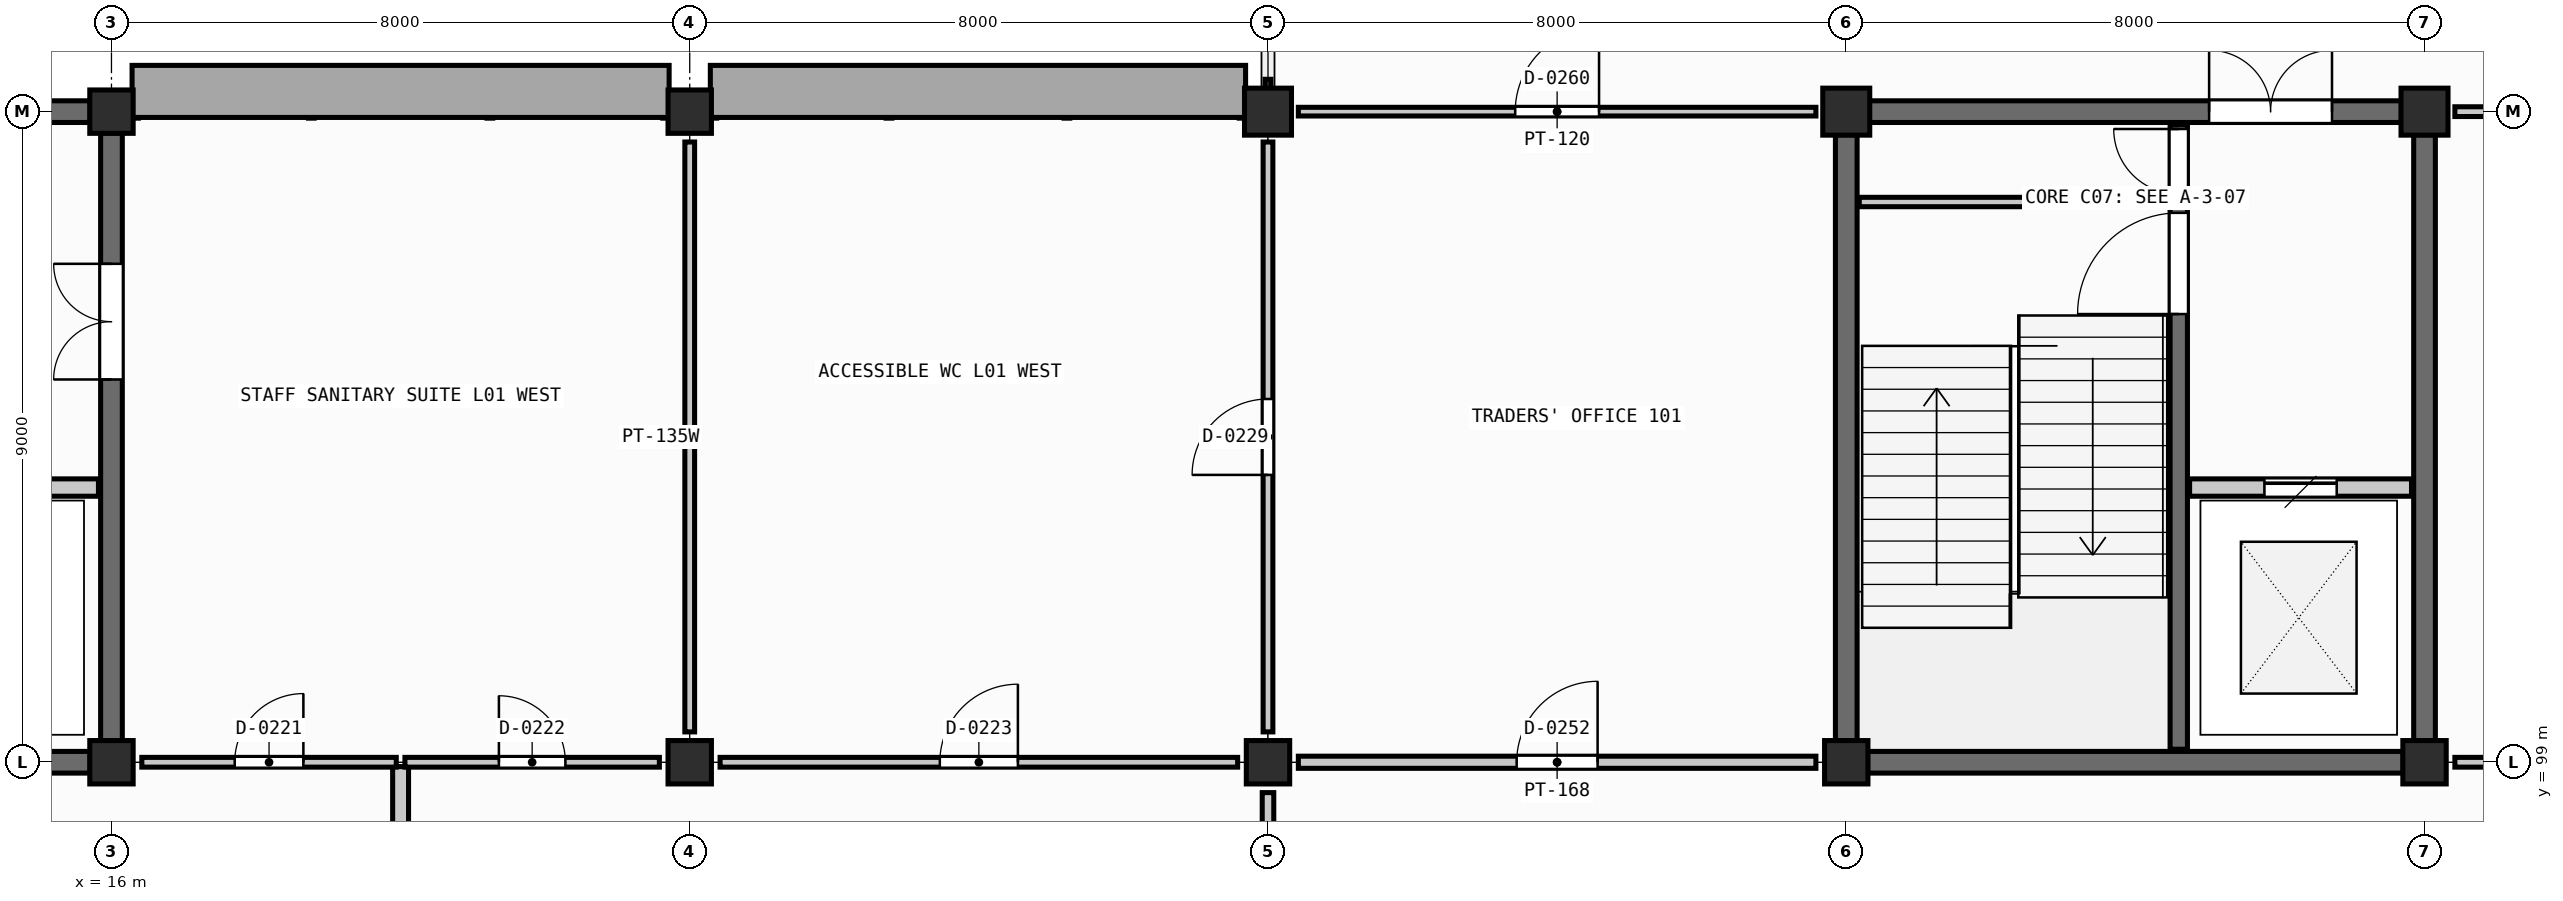
"""IFC4 building model, lengths in metres.
Left out: names, types, materials, properties, quantities, classifications, styles, units other than length and angle.
Written with IfcOpenShell. Run it as: python <this file> out.ifc"""

import sys

from ifc_helpers import new_model, si_unit, direction, frame, frame_2d, origin, origin_2d, place, context, subcontext, project, spatial, rectangle, extrude, element, fill, save


model = new_model("IFC4")
c1 = context("Model", 3, precision=1e-05, world=origin(), true_north=direction((0.0, 1.0)))
c2 = subcontext(c1, "Body", "Model", "MODEL_VIEW")
j1 = project(units=[si_unit("LENGTHUNIT", "METRE"), si_unit("PLANEANGLEUNIT", "RADIAN")], contexts=[c1])
p1 = place(None, origin())
s1 = spatial("IfcSite", under=j1, at=p1, CompositionType="ELEMENT")
p2 = place(p1, origin())
s2 = spatial("IfcBuilding", under=s1, at=p2, CompositionType="ELEMENT")
p3 = place(p2, frame((0.0, 0.0, 4.8)))
s3 = spatial("IfcBuildingStorey", under=s2, at=p3, CompositionType="ELEMENT", Elevation=4.8)
for number, where, z_axis, x_axis in (
    (1, (16.0, 99.0, 0.0), (0.0, 0.0, 1.0), (1.0, 0.0, 0.0)),
    (2, (16.0, 108.0, 0.0), (0.0, 0.0, 1.0), (1.0, 0.0, 0.0)),
    (3, (24.0, 99.0, 0.0), (0.0, 0.0, 1.0), (1.0, 0.0, 0.0)),
    (4, (24.0, 108.0, 0.0), (0.0, 0.0, 1.0), (1.0, 0.0, 0.0)),
    (5, (32.0, 99.0, 0.0), (0.0, 0.0, 1.0), (1.0, 0.0, 0.0)),
):
    element("IfcColumn", number, at=place(p3, frame(where, z_axis=z_axis, x_axis=x_axis)), inside=s3, PredefinedType="COLUMN", context=c2, shape_type="SweptSolid", body=[
        extrude(rectangle(XDim=0.6, YDim=0.6, at=origin_2d()), origin(), (0.0, 0.0, 1.0), 4.2),
    ])
p4 = place(p3, frame((32.0, 108.0, 0.0), z_axis=(0.0, 0.0, 1.0), x_axis=(1.0, 0.0, 0.0)))
e6 = element("IfcColumn", 6, at=p4, inside=s3, PredefinedType="COLUMN", context=c2, shape_type="SweptSolid", body=[
    extrude(rectangle(XDim=0.65, YDim=0.65, at=origin_2d()), origin(), (0.0, 0.0, 1.0), 4.2),
])
p5 = place(p3, frame((40.0, 99.0, 0.0), z_axis=(0.0, 0.0, 1.0), x_axis=(1.0, 0.0, 0.0)))
e7 = element("IfcColumn", 7, at=p5, inside=s3, PredefinedType="COLUMN", context=c2, shape_type="SweptSolid", body=[
    extrude(rectangle(XDim=0.6, YDim=0.6, at=origin_2d()), origin(), (0.0, 0.0, 1.0), 4.2),
])
p6 = place(p3, frame((40.0, 108.0, 0.0), z_axis=(0.0, 0.0, 1.0), x_axis=(1.0, 0.0, 0.0)))
e8 = element("IfcColumn", 8, at=p6, inside=s3, PredefinedType="COLUMN", context=c2, shape_type="SweptSolid", body=[
    extrude(rectangle(XDim=0.65, YDim=0.65, at=origin_2d()), origin(), (0.0, 0.0, 1.0), 4.2),
])
p7 = place(p3, frame((48.0, 99.0, 0.0), z_axis=(0.0, 0.0, 1.0), x_axis=(1.0, 0.0, 0.0)))
e9 = element("IfcColumn", 9, at=p7, inside=s3, PredefinedType="COLUMN", context=c2, shape_type="SweptSolid", body=[
    extrude(rectangle(XDim=0.6, YDim=0.6, at=origin_2d()), origin(), (0.0, 0.0, 1.0), 4.2),
])
p8 = place(p3, frame((48.0, 108.0, 0.0), z_axis=(0.0, 0.0, 1.0), x_axis=(1.0, 0.0, 0.0)))
e10 = element("IfcColumn", 10, at=p8, inside=s3, PredefinedType="COLUMN", context=c2, shape_type="SweptSolid", body=[
    extrude(rectangle(XDim=0.65, YDim=0.65, at=origin_2d()), origin(), (0.0, 0.0, 1.0), 4.2),
])
for number, where, z_axis, x_axis in (
    (11, (8.295, 99.0, 0.0), (0.0, 0.0, 1.0), (1.0, 0.0, 0.0)),
    (12, (8.295, 108.0, 0.0), (0.0, 0.0, 1.0), (1.0, 0.0, 0.0)),
):
    element("IfcWall", number, at=place(p3, frame(where, z_axis=z_axis, x_axis=x_axis)), inside=s3, PredefinedType="SHEAR", context=c2, shape_type="SweptSolid", body=[
        extrude(rectangle(XDim=7.41, YDim=0.3, at=frame_2d((3.705, 0.0))), origin(), (0.0, 0.0, 1.0), 3.935),
    ])
p9 = place(p3, frame((16.0, 99.295, 0.0), z_axis=(0.0, 0.0, 1.0), x_axis=(0.0, 1.0, 0.0)))
e13 = element("IfcWall", 13, at=p9, inside=s3, PredefinedType="SHEAR", context=c2, shape_type="SweptSolid", body=[
    extrude(rectangle(XDim=8.41, YDim=0.3, at=frame_2d((4.205, 0.0))), origin(), (0.0, 0.0, 1.0), 3.935),
])
p10 = place(p9, frame((5.0, 0.0, 0.0)))
e14 = element("IfcOpeningElement", 14, at=p10, cuts=e13, PredefinedType="OPENING", context=c2, shape_type="SweptSolid", body=[
    extrude(rectangle(XDim=1.6, YDim=2.2, at=frame_2d((0.8, 1.1))), frame((0.0, 0.16, 0.0), z_axis=(0.0, -1.0, 0.0), x_axis=(1.0, 0.0, 0.0)), (0.0, 0.0, 1.0), 0.32),
])
p11 = place(p3, frame((12.75, 102.8, 0.0), z_axis=(0.0, 0.0, 1.0), x_axis=(1.0, 0.0, 0.0)))
e15 = element("IfcWall", 15, at=p11, inside=s3, PredefinedType="SHEAR", context=c2, shape_type="SweptSolid", body=[
    extrude(rectangle(XDim=3.07, YDim=0.24, at=frame_2d((1.535, 0.0))), origin(), (0.0, 0.0, 1.0), 3.285),
])
p12 = place(p11, frame((1.035, 0.0, 0.0)))
e16 = element("IfcOpeningElement", 16, at=p12, cuts=e15, PredefinedType="OPENING", context=c2, shape_type="SweptSolid", body=[
    extrude(rectangle(XDim=1.0, YDim=2.15, at=frame_2d((0.5, 1.075))), frame((0.0, 0.13, 0.0), z_axis=(0.0, -1.0, 0.0), x_axis=(1.0, 0.0, 0.0)), (0.0, 0.0, 1.0), 0.26),
])
p13 = place(p3, frame((40.295, 99.0, 0.0), z_axis=(0.0, 0.0, 1.0), x_axis=(1.0, 0.0, 0.0)))
e17 = element("IfcWall", 17, at=p13, inside=s3, PredefinedType="SHEAR", context=c2, shape_type="SweptSolid", body=[
    extrude(rectangle(XDim=7.41, YDim=0.3, at=frame_2d((3.705, 0.0))), origin(), (0.0, 0.0, 1.0), 3.955),
])
p14 = place(p3, frame((40.32, 108.0, 0.0), z_axis=(0.0, 0.0, 1.0), x_axis=(1.0, 0.0, 0.0)))
e18 = element("IfcWall", 18, at=p14, inside=s3, PredefinedType="SHEAR", context=c2, shape_type="SweptSolid", body=[
    extrude(rectangle(XDim=7.36, YDim=0.3, at=frame_2d((3.68, 0.0))), origin(), (0.0, 0.0, 1.0), 3.955),
])
p15 = place(p14, frame((4.7, 0.0, 0.0)))
e19 = element("IfcOpeningElement", 19, at=p15, cuts=e18, PredefinedType="OPENING", context=c2, shape_type="SweptSolid", body=[
    extrude(rectangle(XDim=1.7, YDim=2.25, at=frame_2d((0.85, 1.125))), frame((0.0, 0.16, 0.0), z_axis=(0.0, -1.0, 0.0), x_axis=(1.0, 0.0, 0.0)), (0.0, 0.0, 1.0), 0.32),
])
for number, where, z_axis, x_axis in (
    (20, (40.0, 99.295, 0.0), (0.0, 0.0, 1.0), (0.0, 1.0, 0.0)),
    (21, (48.0, 99.295, 0.0), (0.0, 0.0, 1.0), (0.0, 1.0, 0.0)),
):
    element("IfcWall", number, at=place(p3, frame(where, z_axis=z_axis, x_axis=x_axis)), inside=s3, PredefinedType="SHEAR", context=c2, shape_type="SweptSolid", body=[
        extrude(rectangle(XDim=8.385, YDim=0.3, at=frame_2d((4.192, 0.0))), origin(), (0.0, 0.0, 1.0), 3.955),
    ])
p16 = place(p3, frame((44.6, 99.18, 0.0), z_axis=(0.0, 0.0, 1.0), x_axis=(0.0, 1.0, 0.0)))
e22 = element("IfcWall", 22, at=p16, inside=s3, PredefinedType="SHEAR", context=c2, shape_type="SweptSolid", body=[
    extrude(rectangle(XDim=8.64, YDim=0.24, at=frame_2d((4.32, 0.0))), origin(), (0.0, 0.0, 1.0), 3.955),
])
p17 = place(p16, frame((6.02, 0.0, 0.0)))
e23 = element("IfcOpeningElement", 23, at=p17, cuts=e22, PredefinedType="OPENING", context=c2, shape_type="SweptSolid", body=[
    extrude(rectangle(XDim=1.4, YDim=2.2, at=frame_2d((0.7, 1.1))), frame((0.0, 0.13, 0.0), z_axis=(0.0, -1.0, 0.0), x_axis=(1.0, 0.0, 0.0)), (0.0, 0.0, 1.0), 0.26),
])
p18 = place(p16, frame((7.68, 0.0, 0.0)))
e24 = element("IfcOpeningElement", 24, at=p18, cuts=e22, PredefinedType="OPENING", context=c2, shape_type="SweptSolid", body=[
    extrude(rectangle(XDim=0.9, YDim=2.05, at=frame_2d((0.45, 1.025))), frame((0.0, 0.13, 0.0), z_axis=(0.0, -1.0, 0.0), x_axis=(1.0, 0.0, 0.0)), (0.0, 0.0, 1.0), 0.26),
])
p19 = place(p3, frame((40.18, 106.75, 0.0), z_axis=(0.0, 0.0, 1.0), x_axis=(1.0, 0.0, 0.0)))
e25 = element("IfcWall", 25, at=p19, inside=s3, PredefinedType="PARTITIONING", context=c2, shape_type="SweptSolid", body=[
    extrude(rectangle(XDim=4.28, YDim=0.13, at=frame_2d((2.14, 0.0))), origin(), (0.0, 0.0, 1.0), 3.305),
])
p20 = place(p3, frame((44.75, 102.8, 0.0), z_axis=(0.0, 0.0, 1.0), x_axis=(1.0, 0.0, 0.0)))
e26 = element("IfcWall", 26, at=p20, inside=s3, PredefinedType="SHEAR", context=c2, shape_type="SweptSolid", body=[
    extrude(rectangle(XDim=3.07, YDim=0.24, at=frame_2d((1.535, 0.0))), origin(), (0.0, 0.0, 1.0), 3.305),
])
p21 = place(p20, frame((1.035, 0.0, 0.0)))
e27 = element("IfcOpeningElement", 27, at=p21, cuts=e26, PredefinedType="OPENING", context=c2, shape_type="SweptSolid", body=[
    extrude(rectangle(XDim=1.0, YDim=2.15, at=frame_2d((0.5, 1.075))), frame((0.0, 0.13, 0.0), z_axis=(0.0, -1.0, 0.0), x_axis=(1.0, 0.0, 0.0)), (0.0, 0.0, 1.0), 0.26),
])
p22 = place(p3, frame((20.0, 90.06, 0.0), z_axis=(0.0, 0.0, 1.0), x_axis=(0.0, 1.0, 0.0)))
e28 = element("IfcWall", 28, at=p22, inside=s3, PredefinedType="SOLIDWALL", context=c2, shape_type="SweptSolid", body=[
    extrude(rectangle(XDim=8.88, YDim=0.22, at=frame_2d((4.44, 0.0))), origin(), (0.0, 0.0, 1.0), 3.05),
])
p23 = place(p3, frame((16.42, 99.0, 0.0), z_axis=(0.0, 0.0, 1.0), x_axis=(1.0, 0.0, 0.0)))
e29 = element("IfcWall", 29, at=p23, inside=s3, PredefinedType="PLUMBINGWALL", context=c2, shape_type="SweptSolid", body=[
    extrude(rectangle(XDim=3.52, YDim=0.135, at=frame_2d((1.76, 0.0))), origin(), (0.0, 0.0, 1.0), 3.05),
])
p24 = place(p23, frame((1.285, 0.0, 0.0)))
e30 = element("IfcOpeningElement", 30, at=p24, cuts=e29, PredefinedType="OPENING", context=c2, shape_type="SweptSolid", body=[
    extrude(rectangle(XDim=0.95, YDim=2.1, at=frame_2d((0.475, 1.05))), frame((0.0, 0.078, 0.0), z_axis=(0.0, -1.0, 0.0), x_axis=(1.0, 0.0, 0.0)), (0.0, 0.0, 1.0), 0.155),
])
p25 = place(p3, frame((20.06, 99.0, 0.0), z_axis=(0.0, 0.0, 1.0), x_axis=(1.0, 0.0, 0.0)))
e31 = element("IfcWall", 31, at=p25, inside=s3, PredefinedType="PLUMBINGWALL", context=c2, shape_type="SweptSolid", body=[
    extrude(rectangle(XDim=3.52, YDim=0.135, at=frame_2d((1.76, 0.0))), origin(), (0.0, 0.0, 1.0), 3.05),
])
p26 = place(p25, frame((1.3, 0.0, 0.0)))
e32 = element("IfcOpeningElement", 32, at=p26, cuts=e31, PredefinedType="OPENING", context=c2, shape_type="SweptSolid", body=[
    extrude(rectangle(XDim=0.92, YDim=2.08, at=frame_2d((0.46, 1.04))), frame((0.0, 0.078, 0.0), z_axis=(0.0, -1.0, 0.0), x_axis=(1.0, 0.0, 0.0)), (0.0, 0.0, 1.0), 0.155),
])
p27 = place(p3, frame((24.42, 99.0, 0.0), z_axis=(0.0, 0.0, 1.0), x_axis=(1.0, 0.0, 0.0)))
e33 = element("IfcWall", 33, at=p27, inside=s3, PredefinedType="PLUMBINGWALL", context=c2, shape_type="SweptSolid", body=[
    extrude(rectangle(XDim=7.16, YDim=0.135, at=frame_2d((3.58, 0.0))), origin(), (0.0, 0.0, 1.0), 3.05),
])
p28 = place(p27, frame((3.04, 0.0, 0.0)))
e34 = element("IfcOpeningElement", 34, at=p28, cuts=e33, PredefinedType="OPENING", context=c2, shape_type="SweptSolid", body=[
    extrude(rectangle(XDim=1.08, YDim=2.12, at=frame_2d((0.54, 1.06))), frame((0.0, 0.078, 0.0), z_axis=(0.0, -1.0, 0.0), x_axis=(1.0, 0.0, 0.0)), (0.0, 0.0, 1.0), 0.155),
])
p29 = place(p3, frame((32.0, 90.42, 0.0), z_axis=(0.0, 0.0, 1.0), x_axis=(0.0, 1.0, 0.0)))
e35 = element("IfcWall", 35, at=p29, inside=s3, PredefinedType="PARTITIONING", context=c2, shape_type="SweptSolid", body=[
    extrude(rectangle(XDim=8.16, YDim=0.16, at=frame_2d((4.08, 0.0))), origin(), (0.0, 0.0, 1.0), 3.05),
])
p30 = place(p29, frame((3.51, 0.0, 0.0)))
e36 = element("IfcOpeningElement", 36, at=p30, cuts=e35, PredefinedType="OPENING", context=c2, shape_type="SweptSolid", body=[
    extrude(rectangle(XDim=1.14, YDim=2.19, at=frame_2d((0.57, 1.095))), frame((0.0, 0.09, 0.0), z_axis=(0.0, -1.0, 0.0), x_axis=(1.0, 0.0, 0.0)), (0.0, 0.0, 1.0), 0.18),
])
p31 = place(p3, frame((24.0, 99.42, 0.0), z_axis=(0.0, 0.0, 1.0), x_axis=(0.0, 1.0, 0.0)))
e37 = element("IfcWall", 37, at=p31, inside=s3, PredefinedType="PLUMBINGWALL", context=c2, shape_type="SweptSolid", body=[
    extrude(rectangle(XDim=8.16, YDim=0.135, at=frame_2d((4.08, 0.0))), origin(), (0.0, 0.0, 1.0), 3.05),
])
p32 = place(p3, frame((32.0, 99.42, 0.0), z_axis=(0.0, 0.0, 1.0), x_axis=(0.0, 1.0, 0.0)))
e38 = element("IfcWall", 38, at=p32, inside=s3, PredefinedType="PLUMBINGWALL", context=c2, shape_type="SweptSolid", body=[
    extrude(rectangle(XDim=8.16, YDim=0.135, at=frame_2d((4.08, 0.0))), origin(), (0.0, 0.0, 1.0), 3.05),
])
p33 = place(p32, frame((3.555, 0.0, 0.0)))
e39 = element("IfcOpeningElement", 39, at=p33, cuts=e38, PredefinedType="OPENING", context=c2, shape_type="SweptSolid", body=[
    extrude(rectangle(XDim=1.05, YDim=2.1, at=frame_2d((0.525, 1.05))), frame((0.0, 0.078, 0.0), z_axis=(0.0, -1.0, 0.0), x_axis=(1.0, 0.0, 0.0)), (0.0, 0.0, 1.0), 0.155),
])
p34 = place(p3, frame((32.42, 99.0, 0.0), z_axis=(0.0, 0.0, 1.0), x_axis=(1.0, 0.0, 0.0)))
e40 = element("IfcWall", 40, at=p34, inside=s3, PredefinedType="PARTITIONING", context=c2, shape_type="SweptSolid", body=[
    extrude(rectangle(XDim=7.16, YDim=0.168, at=frame_2d((3.58, 0.0))), origin(), (0.0, 0.0, 1.0), 3.05),
])
p35 = place(p34, frame((3.02, 0.0, 0.0)))
e41 = element("IfcOpeningElement", 41, at=p35, cuts=e40, PredefinedType="OPENING", context=c2, shape_type="SweptSolid", body=[
    extrude(rectangle(XDim=1.12, YDim=2.18, at=frame_2d((0.56, 1.09))), frame((0.0, 0.094, 0.0), z_axis=(0.0, -1.0, 0.0), x_axis=(1.0, 0.0, 0.0)), (0.0, 0.0, 1.0), 0.188),
])
p36 = place(p3, frame((48.42, 99.0, 0.0), z_axis=(0.0, 0.0, 1.0), x_axis=(1.0, 0.0, 0.0)))
e42 = element("IfcWall", 42, at=p36, inside=s3, PredefinedType="PLUMBINGWALL", context=c2, shape_type="SweptSolid", body=[
    extrude(rectangle(XDim=7.16, YDim=0.135, at=frame_2d((3.58, 0.0))), origin(), (0.0, 0.0, 1.0), 3.05),
])
p37 = place(p36, frame((3.105, 0.0, 0.0)))
e43 = element("IfcOpeningElement", 43, at=p37, cuts=e42, PredefinedType="OPENING", context=c2, shape_type="SweptSolid", body=[
    extrude(rectangle(XDim=0.95, YDim=2.1, at=frame_2d((0.475, 1.05))), frame((0.0, 0.078, 0.0), z_axis=(0.0, -1.0, 0.0), x_axis=(1.0, 0.0, 0.0)), (0.0, 0.0, 1.0), 0.155),
])
p38 = place(p3, frame((32.42, 108.0, 0.0), z_axis=(0.0, 0.0, 1.0), x_axis=(1.0, 0.0, 0.0)))
e44 = element("IfcWall", 44, at=p38, inside=s3, PredefinedType="PARTITIONING", context=c2, shape_type="SweptSolid", body=[
    extrude(rectangle(XDim=7.16, YDim=0.12, at=frame_2d((3.58, 0.0))), origin(), (0.0, 0.0, 1.0), 3.05),
])
p39 = place(p38, frame((3.0, 0.0, 0.0)))
e45 = element("IfcOpeningElement", 45, at=p39, cuts=e44, PredefinedType="OPENING", context=c2, shape_type="SweptSolid", body=[
    extrude(rectangle(XDim=1.16, YDim=2.21, at=frame_2d((0.58, 1.105))), frame((0.0, 0.07, 0.0), z_axis=(0.0, -1.0, 0.0), x_axis=(1.0, 0.0, 0.0)), (0.0, 0.0, 1.0), 0.14),
])
p40 = place(p3, frame((48.42, 108.0, 0.0), z_axis=(0.0, 0.0, 1.0), x_axis=(1.0, 0.0, 0.0)))
e46 = element("IfcWall", 46, at=p40, inside=s3, PredefinedType="PLUMBINGWALL", context=c2, shape_type="SweptSolid", body=[
    extrude(rectangle(XDim=7.16, YDim=0.135, at=frame_2d((3.58, 0.0))), origin(), (0.0, 0.0, 1.0), 3.05),
])
p41 = place(p40, frame((3.105, 0.0, 0.0)))
e47 = element("IfcOpeningElement", 47, at=p41, cuts=e46, PredefinedType="OPENING", context=c2, shape_type="SweptSolid", body=[
    extrude(rectangle(XDim=0.95, YDim=2.1, at=frame_2d((0.475, 1.05))), frame((0.0, 0.078, 0.0), z_axis=(0.0, -1.0, 0.0), x_axis=(1.0, 0.0, 0.0)), (0.0, 0.0, 1.0), 0.155),
])
p42 = place(p10, origin())
e48 = element("IfcDoor", 48, at=p42, inside=s3, OperationType="DOUBLE_DOOR_SINGLE_SWING", PredefinedType="DOOR", context=c2, shape_type="SweptSolid", body=[
    extrude(rectangle(XDim=1.6, YDim=2.2, at=frame_2d((0.8, 1.1))), frame((0.0, 0.025, 0.0), z_axis=(0.0, -1.0, 0.0), x_axis=(1.0, 0.0, 0.0)), (0.0, 0.0, 1.0), 0.05),
])
fill(e14, e48)
p43 = place(p17, origin())
e49 = element("IfcDoor", 49, at=p43, inside=s3, OperationType="SINGLE_SWING_LEFT", PredefinedType="DOOR", context=c2, shape_type="SweptSolid", body=[
    extrude(rectangle(XDim=1.4, YDim=2.2, at=frame_2d((0.7, 1.1))), frame((0.0, 0.025, 0.0), z_axis=(0.0, -1.0, 0.0), x_axis=(1.0, 0.0, 0.0)), (0.0, 0.0, 1.0), 0.05),
])
fill(e23, e49)
p44 = place(p18, origin())
e50 = element("IfcDoor", 50, at=p44, inside=s3, OperationType="SINGLE_SWING_RIGHT", PredefinedType="DOOR", context=c2, shape_type="SweptSolid", body=[
    extrude(rectangle(XDim=0.9, YDim=2.05, at=frame_2d((0.45, 1.025))), frame((0.0, 0.025, 0.0), z_axis=(0.0, -1.0, 0.0), x_axis=(1.0, 0.0, 0.0)), (0.0, 0.0, 1.0), 0.05),
])
fill(e24, e50)
p45 = place(p15, origin())
e51 = element("IfcDoor", 51, at=p45, inside=s3, OperationType="DOUBLE_DOOR_SINGLE_SWING", PredefinedType="DOOR", context=c2, shape_type="SweptSolid", body=[
    extrude(rectangle(XDim=1.7, YDim=2.25, at=frame_2d((0.85, 1.125))), frame((0.0, 0.025, 0.0), z_axis=(0.0, -1.0, 0.0), x_axis=(1.0, 0.0, 0.0)), (0.0, 0.0, 1.0), 0.05),
])
fill(e19, e51)
p46 = place(p21, origin())
e52 = element("IfcDoor", 52, at=p46, inside=s3, OperationType="SLIDING_TO_LEFT", PredefinedType="DOOR", context=c2, shape_type="SweptSolid", body=[
    extrude(rectangle(XDim=1.0, YDim=2.15, at=frame_2d((0.5, 1.075))), frame((0.0, 0.025, 0.0), z_axis=(0.0, -1.0, 0.0), x_axis=(1.0, 0.0, 0.0)), (0.0, 0.0, 1.0), 0.05),
])
fill(e27, e52)
p47 = place(p24, origin())
e53 = element("IfcDoor", 53, at=p47, inside=s3, OperationType="SINGLE_SWING_RIGHT", PredefinedType="DOOR", context=c2, shape_type="SweptSolid", body=[
    extrude(rectangle(XDim=0.95, YDim=2.1, at=frame_2d((0.475, 1.05))), frame((0.0, 0.025, 0.0), z_axis=(0.0, -1.0, 0.0), x_axis=(1.0, 0.0, 0.0)), (0.0, 0.0, 1.0), 0.05),
])
fill(e30, e53)
p48 = place(p26, origin())
e54 = element("IfcDoor", 54, at=p48, inside=s3, OperationType="SINGLE_SWING_LEFT", PredefinedType="DOOR", context=c2, shape_type="SweptSolid", body=[
    extrude(rectangle(XDim=0.92, YDim=2.08, at=frame_2d((0.46, 1.04))), frame((0.0, 0.025, 0.0), z_axis=(0.0, -1.0, 0.0), x_axis=(1.0, 0.0, 0.0)), (0.0, 0.0, 1.0), 0.05),
])
fill(e32, e54)
p49 = place(p28, origin())
e55 = element("IfcDoor", 55, at=p49, inside=s3, OperationType="SINGLE_SWING_RIGHT", PredefinedType="DOOR", context=c2, shape_type="SweptSolid", body=[
    extrude(rectangle(XDim=1.08, YDim=2.12, at=frame_2d((0.54, 1.06))), frame((0.0, 0.025, 0.0), z_axis=(0.0, -1.0, 0.0), x_axis=(1.0, 0.0, 0.0)), (0.0, 0.0, 1.0), 0.05),
])
fill(e34, e55)
p50 = place(p33, origin())
e56 = element("IfcDoor", 56, at=p50, inside=s3, OperationType="SINGLE_SWING_LEFT", PredefinedType="DOOR", context=c2, shape_type="SweptSolid", body=[
    extrude(rectangle(XDim=1.05, YDim=2.1, at=frame_2d((0.525, 1.05))), frame((0.0, 0.025, 0.0), z_axis=(0.0, -1.0, 0.0), x_axis=(1.0, 0.0, 0.0)), (0.0, 0.0, 1.0), 0.05),
])
fill(e39, e56)
p51 = place(p35, origin())
e57 = element("IfcDoor", 57, at=p51, inside=s3, OperationType="SINGLE_SWING_RIGHT", PredefinedType="DOOR", context=c2, shape_type="SweptSolid", body=[
    extrude(rectangle(XDim=1.12, YDim=2.18, at=frame_2d((0.56, 1.09))), frame((0.0, 0.025, 0.0), z_axis=(0.0, -1.0, 0.0), x_axis=(1.0, 0.0, 0.0)), (0.0, 0.0, 1.0), 0.05),
])
fill(e41, e57)
p52 = place(p39, origin())
e58 = element("IfcDoor", 58, at=p52, inside=s3, OperationType="SINGLE_SWING_RIGHT", PredefinedType="DOOR", context=c2, shape_type="SweptSolid", body=[
    extrude(rectangle(XDim=1.16, YDim=2.21, at=frame_2d((0.58, 1.105))), frame((0.0, 0.025, 0.0), z_axis=(0.0, -1.0, 0.0), x_axis=(1.0, 0.0, 0.0)), (0.0, 0.0, 1.0), 0.05),
])
fill(e45, e58)
save(model, sys.argv[1])
